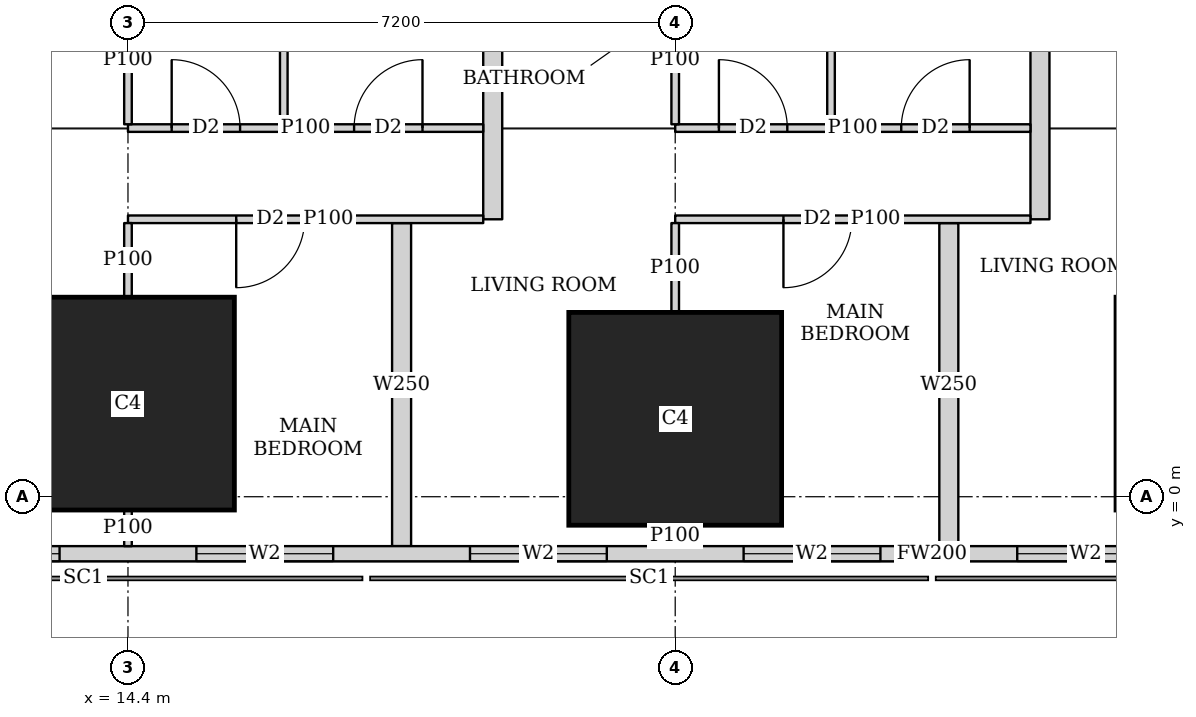
"""IFC4 building model, lengths in metres.
Left out: names, types, materials, properties, quantities, classifications, styles, units other than length and angle.
Written with IfcOpenShell. Run it as: python <this file> out.ifc"""

import sys

from ifc_helpers import new_model, si_unit, direction, frame, frame_2d, origin, origin_2d, place, context, subcontext, project, spatial, rectangle, extrude, element, fill, save


model = new_model("IFC4")
c1 = context("Model", 3, precision=1e-05, world=origin(), true_north=direction((0.0, 1.0)))
c2 = subcontext(c1, "Body", "Model", "MODEL_VIEW")
j1 = project(units=[si_unit("LENGTHUNIT", "METRE"), si_unit("PLANEANGLEUNIT", "RADIAN")], contexts=[c1])
p1 = place(None, origin())
s1 = spatial("IfcSite", under=j1, at=p1, CompositionType="ELEMENT")
p2 = place(p1, origin())
s2 = spatial("IfcBuilding", under=s1, at=p2, CompositionType="ELEMENT")
p3 = place(p2, frame((0.0, 0.0, 65.0)))
s3 = spatial("IfcBuildingStorey", under=s2, at=p3, CompositionType="ELEMENT", Elevation=65.0)
for number, where, z_axis, x_axis in (
    (1, (14.4, 1.225, 0.0), (0.0, 0.0, 1.0), (1.0, 0.0, 0.0)),
    (2, (21.6, 1.025, 0.0), (0.0, 0.0, 1.0), (1.0, 0.0, 0.0)),
):
    element("IfcColumn", number, at=place(p3, frame(where, z_axis=z_axis, x_axis=x_axis)), inside=s3, PredefinedType="COLUMN", context=c2, shape_type="SweptSolid", body=[
        extrude(rectangle(XDim=2.8, YDim=2.8, at=origin_2d()), origin(), (0.0, 0.0, 1.0), 3.75),
    ])
p4 = place(p3, frame((2.163, -0.75, 0.0), z_axis=(0.0, 0.0, 1.0), x_axis=(1.0, 0.0, 0.0)))
e3 = element("IfcWall", 3, at=p4, inside=s3, PredefinedType="SOLIDWALL", context=c2, shape_type="SweptSolid", body=[
    extrude(rectangle(XDim=45.628, YDim=0.2, at=frame_2d((22.814, 0.0))), origin(), (0.0, 0.0, 1.0), 3.5),
])
p5 = place(p4, frame((9.537, 0.0, 0.9)))
e4 = element("IfcOpeningElement", 4, at=p5, cuts=e3, PredefinedType="OPENING", context=c2, shape_type="SweptSolid", body=[
    extrude(rectangle(XDim=1.8, YDim=1.5, at=frame_2d((0.9, 0.75))), frame((0.0, 0.11, 0.0), z_axis=(0.0, -1.0, 0.0), x_axis=(1.0, 0.0, 0.0)), (0.0, 0.0, 1.0), 0.22),
])
p6 = place(p4, frame((13.137, 0.0, 0.9)))
e5 = element("IfcOpeningElement", 5, at=p6, cuts=e3, PredefinedType="OPENING", context=c2, shape_type="SweptSolid", body=[
    extrude(rectangle(XDim=1.8, YDim=1.5, at=frame_2d((0.9, 0.75))), frame((0.0, 0.11, 0.0), z_axis=(0.0, -1.0, 0.0), x_axis=(1.0, 0.0, 0.0)), (0.0, 0.0, 1.0), 0.22),
])
p7 = place(p4, frame((16.737, 0.0, 0.9)))
e6 = element("IfcOpeningElement", 6, at=p7, cuts=e3, PredefinedType="OPENING", context=c2, shape_type="SweptSolid", body=[
    extrude(rectangle(XDim=1.8, YDim=1.5, at=frame_2d((0.9, 0.75))), frame((0.0, 0.11, 0.0), z_axis=(0.0, -1.0, 0.0), x_axis=(1.0, 0.0, 0.0)), (0.0, 0.0, 1.0), 0.22),
])
p8 = place(p4, frame((20.337, 0.0, 0.9)))
e7 = element("IfcOpeningElement", 7, at=p8, cuts=e3, PredefinedType="OPENING", context=c2, shape_type="SweptSolid", body=[
    extrude(rectangle(XDim=1.8, YDim=1.5, at=frame_2d((0.9, 0.75))), frame((0.0, 0.11, 0.0), z_axis=(0.0, -1.0, 0.0), x_axis=(1.0, 0.0, 0.0)), (0.0, 0.0, 1.0), 0.22),
])
p9 = place(p4, frame((23.937, 0.0, 0.9)))
e8 = element("IfcOpeningElement", 8, at=p9, cuts=e3, PredefinedType="OPENING", context=c2, shape_type="SweptSolid", body=[
    extrude(rectangle(XDim=1.8, YDim=1.5, at=frame_2d((0.9, 0.75))), frame((0.0, 0.11, 0.0), z_axis=(0.0, -1.0, 0.0), x_axis=(1.0, 0.0, 0.0)), (0.0, 0.0, 1.0), 0.22),
])
p10 = place(p4, frame((27.537, 0.0, 0.9)))
e9 = element("IfcOpeningElement", 9, at=p10, cuts=e3, PredefinedType="OPENING", context=c2, shape_type="SweptSolid", body=[
    extrude(rectangle(XDim=1.8, YDim=1.5, at=frame_2d((0.9, 0.75))), frame((0.0, 0.11, 0.0), z_axis=(0.0, -1.0, 0.0), x_axis=(1.0, 0.0, 0.0)), (0.0, 0.0, 1.0), 0.22),
])
p11 = place(p4, frame((31.137, 0.0, 0.9)))
e10 = element("IfcOpeningElement", 10, at=p11, cuts=e3, PredefinedType="OPENING", context=c2, shape_type="SweptSolid", body=[
    extrude(rectangle(XDim=1.8, YDim=1.5, at=frame_2d((0.9, 0.75))), frame((0.0, 0.11, 0.0), z_axis=(0.0, -1.0, 0.0), x_axis=(1.0, 0.0, 0.0)), (0.0, 0.0, 1.0), 0.22),
])
p12 = place(p4, frame((34.737, 0.0, 0.9)))
e11 = element("IfcOpeningElement", 11, at=p12, cuts=e3, PredefinedType="OPENING", context=c2, shape_type="SweptSolid", body=[
    extrude(rectangle(XDim=1.8, YDim=1.5, at=frame_2d((0.9, 0.75))), frame((0.0, 0.11, 0.0), z_axis=(0.0, -1.0, 0.0), x_axis=(1.0, 0.0, 0.0)), (0.0, 0.0, 1.0), 0.22),
])
p13 = place(p3, frame((19.074, 3.65, 0.0), z_axis=(0.0, 0.0, 1.0), x_axis=(-1.0, 0.0, 0.0)))
e12 = element("IfcWall", 12, at=p13, inside=s3, PredefinedType="PARTITIONING", context=c2, shape_type="SweptSolid", body=[
    extrude(rectangle(XDim=4.674, YDim=0.1, at=frame_2d((2.337, 0.0))), origin(), (0.0, 0.0, 1.0), 3.5),
])
p14 = place(p13, frame((2.35, 0.0, 0.0)))
e13 = element("IfcOpeningElement", 13, at=p14, cuts=e12, PredefinedType="OPENING", context=c2, shape_type="SweptSolid", body=[
    extrude(rectangle(XDim=0.9, YDim=2.1, at=frame_2d((0.45, 1.05))), frame((0.0, 0.06, 0.0), z_axis=(0.0, -1.0, 0.0), x_axis=(1.0, 0.0, 0.0)), (0.0, 0.0, 1.0), 0.12),
])
p15 = place(p3, frame((19.074, 4.85, 0.0), z_axis=(0.0, 0.0, 1.0), x_axis=(-1.0, 0.0, 0.0)))
e14 = element("IfcWall", 14, at=p15, inside=s3, PredefinedType="PARTITIONING", context=c2, shape_type="SweptSolid", body=[
    extrude(rectangle(XDim=4.674, YDim=0.1, at=frame_2d((2.337, 0.0))), origin(), (0.0, 0.0, 1.0), 3.5),
])
p16 = place(p15, frame((3.199, 0.0, 0.0)))
e15 = element("IfcOpeningElement", 15, at=p16, cuts=e14, PredefinedType="OPENING", context=c2, shape_type="SweptSolid", body=[
    extrude(rectangle(XDim=0.9, YDim=2.1, at=frame_2d((0.45, 1.05))), frame((0.0, 0.06, 0.0), z_axis=(0.0, -1.0, 0.0), x_axis=(1.0, 0.0, 0.0)), (0.0, 0.0, 1.0), 0.12),
])
p17 = place(p15, frame((0.799, 0.0, 0.0)))
e16 = element("IfcOpeningElement", 16, at=p17, cuts=e14, PredefinedType="OPENING", context=c2, shape_type="SweptSolid", body=[
    extrude(rectangle(XDim=0.9, YDim=2.1, at=frame_2d((0.45, 1.05))), frame((0.0, 0.06, 0.0), z_axis=(0.0, -1.0, 0.0), x_axis=(1.0, 0.0, 0.0)), (0.0, 0.0, 1.0), 0.12),
])
p18 = place(p3, frame((14.4, -0.65, 0.0), z_axis=(0.0, 0.0, 1.0), x_axis=(0.0, 1.0, 0.0)))
e17 = element("IfcWall", 17, at=p18, inside=s3, PredefinedType="PARTITIONING", context=c2, shape_type="SweptSolid", body=[
    extrude(rectangle(XDim=0.474, YDim=0.1, at=frame_2d((0.237, 0.0))), origin(), (0.0, 0.0, 1.0), 3.5),
])
p19 = place(p3, frame((14.4, 2.626, 0.0), z_axis=(0.0, 0.0, 1.0), x_axis=(0.0, 1.0, 0.0)))
e18 = element("IfcWall", 18, at=p19, inside=s3, PredefinedType="PARTITIONING", context=c2, shape_type="SweptSolid", body=[
    extrude(rectangle(XDim=0.974, YDim=0.1, at=frame_2d((0.487, 0.0))), origin(), (0.0, 0.0, 1.0), 3.5),
])
p20 = place(p3, frame((14.4, 4.9, 0.0), z_axis=(0.0, 0.0, 1.0), x_axis=(0.0, 1.0, 0.0)))
e19 = element("IfcWall", 19, at=p20, inside=s3, PredefinedType="PARTITIONING", context=c2, shape_type="SweptSolid", body=[
    extrude(rectangle(XDim=1.699, YDim=0.1, at=frame_2d((0.85, 0.0))), origin(), (0.0, 0.0, 1.0), 3.5),
])
p21 = place(p3, frame((16.45, 4.9, 0.0), z_axis=(0.0, 0.0, 1.0), x_axis=(0.0, 1.0, 0.0)))
e20 = element("IfcWall", 20, at=p21, inside=s3, PredefinedType="PARTITIONING", context=c2, shape_type="SweptSolid", body=[
    extrude(rectangle(XDim=3.525, YDim=0.1, at=frame_2d((1.763, 0.0))), origin(), (0.0, 0.0, 1.0), 3.5),
])
p22 = place(p3, frame((26.274, 3.65, 0.0), z_axis=(0.0, 0.0, 1.0), x_axis=(-1.0, 0.0, 0.0)))
e21 = element("IfcWall", 21, at=p22, inside=s3, PredefinedType="PARTITIONING", context=c2, shape_type="SweptSolid", body=[
    extrude(rectangle(XDim=4.674, YDim=0.1, at=frame_2d((2.337, 0.0))), origin(), (0.0, 0.0, 1.0), 3.5),
])
p23 = place(p22, frame((2.35, 0.0, 0.0)))
e22 = element("IfcOpeningElement", 22, at=p23, cuts=e21, PredefinedType="OPENING", context=c2, shape_type="SweptSolid", body=[
    extrude(rectangle(XDim=0.9, YDim=2.1, at=frame_2d((0.45, 1.05))), frame((0.0, 0.06, 0.0), z_axis=(0.0, -1.0, 0.0), x_axis=(1.0, 0.0, 0.0)), (0.0, 0.0, 1.0), 0.12),
])
p24 = place(p3, frame((26.274, 4.85, 0.0), z_axis=(0.0, 0.0, 1.0), x_axis=(-1.0, 0.0, 0.0)))
e23 = element("IfcWall", 23, at=p24, inside=s3, PredefinedType="PARTITIONING", context=c2, shape_type="SweptSolid", body=[
    extrude(rectangle(XDim=4.674, YDim=0.1, at=frame_2d((2.337, 0.0))), origin(), (0.0, 0.0, 1.0), 3.5),
])
p25 = place(p24, frame((3.199, 0.0, 0.0)))
e24 = element("IfcOpeningElement", 24, at=p25, cuts=e23, PredefinedType="OPENING", context=c2, shape_type="SweptSolid", body=[
    extrude(rectangle(XDim=0.9, YDim=2.1, at=frame_2d((0.45, 1.05))), frame((0.0, 0.06, 0.0), z_axis=(0.0, -1.0, 0.0), x_axis=(1.0, 0.0, 0.0)), (0.0, 0.0, 1.0), 0.12),
])
p26 = place(p24, frame((0.8, 0.0, 0.0)))
e25 = element("IfcOpeningElement", 25, at=p26, cuts=e23, PredefinedType="OPENING", context=c2, shape_type="SweptSolid", body=[
    extrude(rectangle(XDim=0.9, YDim=2.1, at=frame_2d((0.45, 1.05))), frame((0.0, 0.06, 0.0), z_axis=(0.0, -1.0, 0.0), x_axis=(1.0, 0.0, 0.0)), (0.0, 0.0, 1.0), 0.12),
])
p27 = place(p3, frame((21.6, -0.65, 0.0), z_axis=(0.0, 0.0, 1.0), x_axis=(0.0, 1.0, 0.0)))
e26 = element("IfcWall", 26, at=p27, inside=s3, PredefinedType="PARTITIONING", context=c2, shape_type="SweptSolid", body=[
    extrude(rectangle(XDim=0.274, YDim=0.1, at=frame_2d((0.137, 0.0))), origin(), (0.0, 0.0, 1.0), 3.5),
])
p28 = place(p3, frame((21.6, 2.426, 0.0), z_axis=(0.0, 0.0, 1.0), x_axis=(0.0, 1.0, 0.0)))
e27 = element("IfcWall", 27, at=p28, inside=s3, PredefinedType="PARTITIONING", context=c2, shape_type="SweptSolid", body=[
    extrude(rectangle(XDim=1.174, YDim=0.1, at=frame_2d((0.587, 0.0))), origin(), (0.0, 0.0, 1.0), 3.5),
])
p29 = place(p3, frame((21.6, 4.9, 0.0), z_axis=(0.0, 0.0, 1.0), x_axis=(0.0, 1.0, 0.0)))
e28 = element("IfcWall", 28, at=p29, inside=s3, PredefinedType="PARTITIONING", context=c2, shape_type="SweptSolid", body=[
    extrude(rectangle(XDim=1.699, YDim=0.1, at=frame_2d((0.85, 0.0))), origin(), (0.0, 0.0, 1.0), 3.5),
])
p30 = place(p3, frame((23.65, 4.9, 0.0), z_axis=(0.0, 0.0, 1.0), x_axis=(0.0, 1.0, 0.0)))
e29 = element("IfcWall", 29, at=p30, inside=s3, PredefinedType="PARTITIONING", context=c2, shape_type="SweptSolid", body=[
    extrude(rectangle(XDim=3.525, YDim=0.1, at=frame_2d((1.763, 0.0))), origin(), (0.0, 0.0, 1.0), 3.5),
])
p31 = place(p3, frame((18.0, -0.65, 0.0), z_axis=(0.0, 0.0, 1.0), x_axis=(0.0, 1.0, 0.0)))
e30 = element("IfcWall", 30, at=p31, inside=s3, PredefinedType="SOLIDWALL", context=c2, shape_type="SweptSolid", body=[
    extrude(rectangle(XDim=4.25, YDim=0.25, at=frame_2d((2.125, 0.0))), origin(), (0.0, 0.0, 1.0), 2.05),
])
p32 = place(p3, frame((19.199, 3.65, 0.0), z_axis=(0.0, 0.0, 1.0), x_axis=(0.0, 1.0, 0.0)))
e31 = element("IfcWall", 31, at=p32, inside=s3, PredefinedType="SOLIDWALL", context=c2, shape_type="SweptSolid", body=[
    extrude(rectangle(XDim=4.775, YDim=0.25, at=frame_2d((2.388, 0.0))), origin(), (0.0, 0.0, 1.0), 3.5),
])
p33 = place(p3, frame((25.2, -0.65, 0.0), z_axis=(0.0, 0.0, 1.0), x_axis=(0.0, 1.0, 0.0)))
e32 = element("IfcWall", 32, at=p33, inside=s3, PredefinedType="SOLIDWALL", context=c2, shape_type="SweptSolid", body=[
    extrude(rectangle(XDim=4.25, YDim=0.25, at=frame_2d((2.125, 0.0))), origin(), (0.0, 0.0, 1.0), 2.05),
])
p34 = place(p3, frame((26.399, 3.65, 0.0), z_axis=(0.0, 0.0, 1.0), x_axis=(0.0, 1.0, 0.0)))
e33 = element("IfcWall", 33, at=p34, inside=s3, PredefinedType="SOLIDWALL", context=c2, shape_type="SweptSolid", body=[
    extrude(rectangle(XDim=4.775, YDim=0.25, at=frame_2d((2.388, 0.0))), origin(), (0.0, 0.0, 1.0), 3.5),
])
p35 = place(p5, origin())
e34 = element("IfcWindow", 34, at=p35, inside=s3, PartitioningType="SINGLE_PANEL", PredefinedType="WINDOW", context=c2, shape_type="SweptSolid", body=[
    extrude(rectangle(XDim=1.8, YDim=1.5, at=frame_2d((0.9, 0.75))), frame((0.0, 0.03, 0.0), z_axis=(0.0, -1.0, 0.0), x_axis=(1.0, 0.0, 0.0)), (0.0, 0.0, 1.0), 0.06),
])
fill(e4, e34)
p36 = place(p6, origin())
e35 = element("IfcWindow", 35, at=p36, inside=s3, PartitioningType="SINGLE_PANEL", PredefinedType="WINDOW", context=c2, shape_type="SweptSolid", body=[
    extrude(rectangle(XDim=1.8, YDim=1.5, at=frame_2d((0.9, 0.75))), frame((0.0, 0.03, 0.0), z_axis=(0.0, -1.0, 0.0), x_axis=(1.0, 0.0, 0.0)), (0.0, 0.0, 1.0), 0.06),
])
fill(e5, e35)
p37 = place(p7, origin())
e36 = element("IfcWindow", 36, at=p37, inside=s3, PartitioningType="SINGLE_PANEL", PredefinedType="WINDOW", context=c2, shape_type="SweptSolid", body=[
    extrude(rectangle(XDim=1.8, YDim=1.5, at=frame_2d((0.9, 0.75))), frame((0.0, 0.03, 0.0), z_axis=(0.0, -1.0, 0.0), x_axis=(1.0, 0.0, 0.0)), (0.0, 0.0, 1.0), 0.06),
])
fill(e6, e36)
p38 = place(p8, origin())
e37 = element("IfcWindow", 37, at=p38, inside=s3, PartitioningType="SINGLE_PANEL", PredefinedType="WINDOW", context=c2, shape_type="SweptSolid", body=[
    extrude(rectangle(XDim=1.8, YDim=1.5, at=frame_2d((0.9, 0.75))), frame((0.0, 0.03, 0.0), z_axis=(0.0, -1.0, 0.0), x_axis=(1.0, 0.0, 0.0)), (0.0, 0.0, 1.0), 0.06),
])
fill(e7, e37)
p39 = place(p9, origin())
e38 = element("IfcWindow", 38, at=p39, inside=s3, PartitioningType="SINGLE_PANEL", PredefinedType="WINDOW", context=c2, shape_type="SweptSolid", body=[
    extrude(rectangle(XDim=1.8, YDim=1.5, at=frame_2d((0.9, 0.75))), frame((0.0, 0.03, 0.0), z_axis=(0.0, -1.0, 0.0), x_axis=(1.0, 0.0, 0.0)), (0.0, 0.0, 1.0), 0.06),
])
fill(e8, e38)
p40 = place(p14, origin())
e39 = element("IfcDoor", 39, at=p40, inside=s3, OperationType="SINGLE_SWING_RIGHT", PredefinedType="DOOR", context=c2, shape_type="SweptSolid", body=[
    extrude(rectangle(XDim=0.9, YDim=2.1, at=frame_2d((0.45, 1.05))), frame((0.0, 0.025, 0.0), z_axis=(0.0, -1.0, 0.0), x_axis=(1.0, 0.0, 0.0)), (0.0, 0.0, 1.0), 0.05),
])
fill(e13, e39)
p41 = place(p16, origin())
e40 = element("IfcDoor", 40, at=p41, inside=s3, OperationType="SINGLE_SWING_LEFT", PredefinedType="DOOR", context=c2, shape_type="SweptSolid", body=[
    extrude(rectangle(XDim=0.9, YDim=2.1, at=frame_2d((0.45, 1.05))), frame((0.0, 0.025, 0.0), z_axis=(0.0, -1.0, 0.0), x_axis=(1.0, 0.0, 0.0)), (0.0, 0.0, 1.0), 0.05),
])
fill(e15, e40)
p42 = place(p17, origin())
e41 = element("IfcDoor", 41, at=p42, inside=s3, OperationType="SINGLE_SWING_RIGHT", PredefinedType="DOOR", context=c2, shape_type="SweptSolid", body=[
    extrude(rectangle(XDim=0.9, YDim=2.1, at=frame_2d((0.45, 1.05))), frame((0.0, 0.025, 0.0), z_axis=(0.0, -1.0, 0.0), x_axis=(1.0, 0.0, 0.0)), (0.0, 0.0, 1.0), 0.05),
])
fill(e16, e41)
p43 = place(p23, origin())
e42 = element("IfcDoor", 42, at=p43, inside=s3, OperationType="SINGLE_SWING_RIGHT", PredefinedType="DOOR", context=c2, shape_type="SweptSolid", body=[
    extrude(rectangle(XDim=0.9, YDim=2.1, at=frame_2d((0.45, 1.05))), frame((0.0, 0.025, 0.0), z_axis=(0.0, -1.0, 0.0), x_axis=(1.0, 0.0, 0.0)), (0.0, 0.0, 1.0), 0.05),
])
fill(e22, e42)
p44 = place(p25, origin())
e43 = element("IfcDoor", 43, at=p44, inside=s3, OperationType="SINGLE_SWING_LEFT", PredefinedType="DOOR", context=c2, shape_type="SweptSolid", body=[
    extrude(rectangle(XDim=0.9, YDim=2.1, at=frame_2d((0.45, 1.05))), frame((0.0, 0.025, 0.0), z_axis=(0.0, -1.0, 0.0), x_axis=(1.0, 0.0, 0.0)), (0.0, 0.0, 1.0), 0.05),
])
fill(e24, e43)
p45 = place(p26, origin())
e44 = element("IfcDoor", 44, at=p45, inside=s3, OperationType="SINGLE_SWING_RIGHT", PredefinedType="DOOR", context=c2, shape_type="SweptSolid", body=[
    extrude(rectangle(XDim=0.9, YDim=2.1, at=frame_2d((0.45, 1.05))), frame((0.0, 0.025, 0.0), z_axis=(0.0, -1.0, 0.0), x_axis=(1.0, 0.0, 0.0)), (0.0, 0.0, 1.0), 0.05),
])
fill(e25, e44)
save(model, sys.argv[1])
